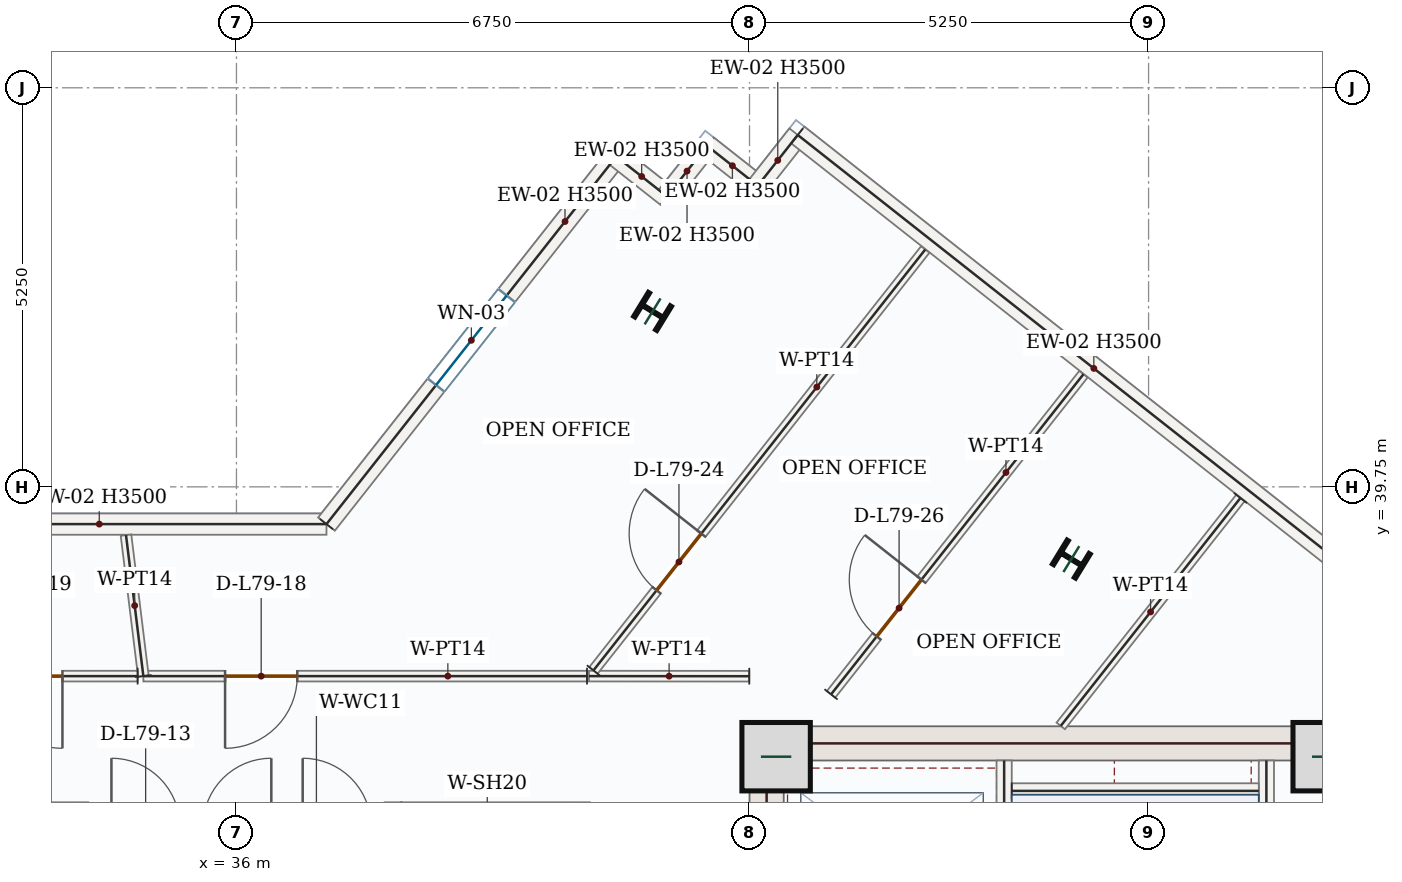
"""IFC4 building model, lengths in metres.
Left out: names, types, materials, properties, quantities, classifications, styles, units other than length and angle.
Written with IfcOpenShell. Run it as: python <this file> out.ifc"""

import sys

from ifc_helpers import new_model, si_unit, direction, frame, frame_2d, origin, origin_2d, place, context, subcontext, project, spatial, rectangle, i_section, extrude, source, transform, mapped, element, fill, save


model = new_model("IFC4")
c1 = context("Model", 3, precision=1e-05, world=origin(), true_north=direction((0.0, 1.0)))
c2 = subcontext(c1, "Body", "Model", "MODEL_VIEW")
j1 = project(units=[si_unit("LENGTHUNIT", "METRE"), si_unit("PLANEANGLEUNIT", "RADIAN")], contexts=[c1])
p1 = place(None, origin())
s1 = spatial("IfcSite", under=j1, at=p1, CompositionType="ELEMENT")
p2 = place(p1, origin())
s2 = spatial("IfcBuilding", under=s1, at=p2, CompositionType="ELEMENT")
p3 = place(p2, frame((0.0, 0.0, 327.3)))
s3 = spatial("IfcBuildingStorey", under=s2, at=p3, CompositionType="ELEMENT", Elevation=327.3)
p4 = place(p3, frame((42.975, 28.05, 0.0), z_axis=(0.0, 0.0, 1.0), x_axis=(0.0, 1.0, 0.0)))
e1 = element("IfcWall", 1, at=p4, inside=s3, PredefinedType="SHEAR", context=c2, shape_type="SweptSolid", body=[
    extrude(rectangle(XDim=8.55, YDim=0.45, at=frame_2d((4.275, 0.0))), origin(), (0.0, 0.0, 1.0), 3.5),
])
p5 = place(p4, frame((1.5, 0.0, 0.0)))
e2 = element("IfcOpeningElement", 2, at=p5, cuts=e1, PredefinedType="OPENING", context=c2, shape_type="SweptSolid", body=[
    extrude(rectangle(XDim=1.1, YDim=2.2, at=frame_2d((0.55, 1.1))), frame((0.0, 0.235, 0.0), z_axis=(0.0, -1.0, 0.0), x_axis=(1.0, 0.0, 0.0)), (0.0, 0.0, 1.0), 0.47),
])
m1 = source(origin(), c2, "Body", "SweptSolid", [
    extrude(rectangle(XDim=7.1, YDim=0.45, at=frame_2d((3.55, 0.0))), origin(), (0.0, 0.0, 1.0), 3.5),
])
p6 = place(p3, frame((43.2, 36.375, 0.0), z_axis=(0.0, 0.0, 1.0), x_axis=(1.0, 0.0, 0.0)))
e3 = element("IfcWall", 3, at=p6, inside=s3, PredefinedType="SHEAR", context=c2, shape_type="MappedRepresentation", body=[
    mapped(m1, transform((0.0, 0.0, 0.0), x_axis=(1.0, 0.0, 0.0), y_axis=(0.0, 1.0, 0.0), z_axis=(0.0, 0.0, 1.0), scale=1.0)),
])
m2 = source(origin(), c2, "Body", "SweptSolid", [
    extrude(rectangle(XDim=0.9, YDim=0.9, at=origin_2d()), origin(), (0.0, 0.0, 1.0), 3.75),
])
for number, where, z_axis, x_axis in (
    (4, (43.1, 36.2, 0.0), (0.0, 0.0, 1.0), (1.0, 0.0, 0.0)),
    (5, (50.35, 36.2, 0.0), (0.0, 0.0, 1.0), (1.0, 0.0, 0.0)),
):
    element("IfcColumn", number, at=place(p3, frame(where, z_axis=z_axis, x_axis=x_axis)), inside=s3, PredefinedType="COLUMN", context=c2, shape_type="MappedRepresentation", body=[
        mapped(m2, transform((0.0, 0.0, 0.0), x_axis=(1.0, 0.0, 0.0), y_axis=(0.0, 1.0, 0.0), z_axis=(0.0, 0.0, 1.0), scale=1.0)),
    ])
m3 = source(origin(), c2, "Body", "SweptSolid", [
    extrude(i_section(OverallWidth=0.369, OverallDepth=0.356, WebThickness=0.011, FlangeThickness=0.018, FilletRadius=0.018, at=origin_2d()), origin(), (0.0, 0.0, 1.0), 3.75),
])
for number, where, z_axis, x_axis in (
    (6, (46.984, 38.8, 0.0), (0.0, 0.0, 1.0), (0.522, 0.853, 0.0)),
    (7, (41.475, 42.058, 0.0), (0.0, 0.0, 1.0), (0.522, 0.853, 0.0)),
):
    element("IfcColumn", number, at=place(p3, frame(where, z_axis=z_axis, x_axis=x_axis)), inside=s3, PredefinedType="COLUMN", context=c2, shape_type="MappedRepresentation", body=[
        mapped(m3, transform((0.0, 0.0, 0.0), x_axis=(1.0, 0.0, 0.0), y_axis=(0.0, 1.0, 0.0), z_axis=(0.0, 0.0, 1.0), scale=1.0)),
    ])
m4 = source(origin(), c2, "Body", "SweptSolid", [
    extrude(rectangle(XDim=5.978, YDim=0.28, at=frame_2d((2.989, 0.0))), origin(), (0.0, 0.0, 1.0), 3.5),
])
p7 = place(p3, frame((31.206, 39.26, 0.0), z_axis=(0.0, 0.0, 1.0), x_axis=(1.0, 0.0, 0.0)))
e8 = element("IfcWall", 8, at=p7, inside=s3, PredefinedType="SOLIDWALL", context=c2, shape_type="MappedRepresentation", body=[
    mapped(m4, transform((0.0, 0.0, 0.0), x_axis=(1.0, 0.0, 0.0), y_axis=(0.0, 1.0, 0.0), z_axis=(0.0, 0.0, 1.0), scale=1.0)),
])
p8 = place(p3, frame((37.184, 39.26, 0.0), z_axis=(0.0, 0.0, 1.0), x_axis=(0.619100474058, 0.78531178714, 0.0)))
e9 = element("IfcWall", 9, at=p8, inside=s3, PredefinedType="SOLIDWALL", context=c2, shape_type="SweptSolid", body=[
    extrude(rectangle(XDim=6.159, YDim=0.28, at=frame_2d((3.08, 0.0))), origin(), (0.0, 0.0, 1.0), 3.5),
])
p9 = place(p8, frame((2.329, 0.0, 0.85)))
e10 = element("IfcOpeningElement", 10, at=p9, cuts=e9, PredefinedType="OPENING", context=c2, shape_type="SweptSolid", body=[
    extrude(rectangle(XDim=1.5, YDim=1.5, at=frame_2d((0.75, 0.75))), frame((0.0, 0.15, 0.0), z_axis=(0.0, -1.0, 0.0), x_axis=(1.0, 0.0, 0.0)), (0.0, 0.0, 1.0), 0.3),
])
m5 = source(origin(), c2, "Body", "SweptSolid", [
    extrude(rectangle(XDim=0.85, YDim=0.28, at=frame_2d((0.425, 0.0))), origin(), (0.0, 0.0, 1.0), 3.5),
])
p10 = place(p3, frame((40.997, 44.097, 0.0), z_axis=(0.0, 0.0, 1.0), x_axis=(0.785220826193, -0.619215838066, 0.0)))
e11 = element("IfcWall", 11, at=p10, inside=s3, PredefinedType="SOLIDWALL", context=c2, shape_type="MappedRepresentation", body=[
    mapped(m5, transform((0.0, 0.0, 0.0), x_axis=(1.0, 0.0, 0.0), y_axis=(0.0, 1.0, 0.0), z_axis=(0.0, 0.0, 1.0), scale=1.0)),
])
m6 = source(origin(), c2, "Body", "SweptSolid", [
    extrude(rectangle(XDim=0.85, YDim=0.28, at=frame_2d((0.425, 0.0))), origin(), (0.0, 0.0, 1.0), 3.5),
])
for number, where, z_axis, x_axis in (
    (12, (41.665, 43.57, 0.0), (0.0, 0.0, 1.0), (0.619, 0.785, 0.0)),
    (13, (42.191, 44.238, 0.0), (0.0, 0.0, 1.0), (0.785, -0.619, 0.0)),
):
    element("IfcWall", number, at=place(p3, frame(where, z_axis=z_axis, x_axis=x_axis)), inside=s3, PredefinedType="SOLIDWALL", context=c2, shape_type="MappedRepresentation", body=[
        mapped(m6, transform((0.0, 0.0, 0.0), x_axis=(1.0, 0.0, 0.0), y_axis=(0.0, 1.0, 0.0), z_axis=(0.0, 0.0, 1.0), scale=1.0)),
    ])
p11 = place(p3, frame((42.858, 43.712, 0.0), z_axis=(0.0, 0.0, 1.0), x_axis=(0.619215838066, 0.785220826193, 0.0)))
e14 = element("IfcWall", 14, at=p11, inside=s3, PredefinedType="SOLIDWALL", context=c2, shape_type="MappedRepresentation", body=[
    mapped(m5, transform((0.0, 0.0, 0.0), x_axis=(1.0, 0.0, 0.0), y_axis=(0.0, 1.0, 0.0), z_axis=(0.0, 0.0, 1.0), scale=1.0)),
])
m7 = source(origin(), c2, "Body", "SweptSolid", [
    extrude(rectangle(XDim=9.92, YDim=0.28, at=frame_2d((4.96, 0.0))), origin(), (0.0, 0.0, 1.0), 3.5),
])
p12 = place(p3, frame((43.385, 44.379, 0.0), z_axis=(0.0, 0.0, 1.0), x_axis=(0.785317257435, -0.619093535077, 0.0)))
e15 = element("IfcWall", 15, at=p12, inside=s3, PredefinedType="SOLIDWALL", context=c2, shape_type="MappedRepresentation", body=[
    mapped(m7, transform((0.0, 0.0, 0.0), x_axis=(1.0, 0.0, 0.0), y_axis=(0.0, 1.0, 0.0), z_axis=(0.0, 0.0, 1.0), scale=1.0)),
])
m8 = source(origin(), c2, "Body", "SweptSolid", [
    extrude(rectangle(XDim=7.87, YDim=0.2, at=frame_2d((3.935, 0.0))), origin(), (0.0, 0.0, 1.0), 3.5),
])
p13 = place(p3, frame((49.55, 28.28, 0.0), z_axis=(0.0, 0.0, 1.0), x_axis=(0.0, 1.0, 0.0)))
e16 = element("IfcWall", 16, at=p13, inside=s3, PredefinedType="SOLIDWALL", context=c2, shape_type="MappedRepresentation", body=[
    mapped(m8, transform((0.0, 0.0, 0.0), x_axis=(1.0, 0.0, 0.0), y_axis=(0.0, 1.0, 0.0), z_axis=(0.0, 0.0, 1.0), scale=1.0)),
])
p14 = place(p3, frame((46.1, 28.15, 0.0), z_axis=(0.0, 0.0, 1.0), x_axis=(0.0, 1.0, 0.0)))
e17 = element("IfcWall", 17, at=p14, inside=s3, PredefinedType="SOLIDWALL", context=c2, shape_type="SweptSolid", body=[
    extrude(rectangle(XDim=8.0, YDim=0.2, at=frame_2d((4.0, 0.0))), origin(), (0.0, 0.0, 1.0), 3.5),
])
p15 = place(p14, frame((0.4, 0.0, 0.0)))
e18 = element("IfcOpeningElement", 18, at=p15, cuts=e17, PredefinedType="OPENING", context=c2, shape_type="SweptSolid", body=[
    extrude(rectangle(XDim=1.05, YDim=2.15, at=frame_2d((0.525, 1.075))), frame((0.0, 0.11, 0.0), z_axis=(0.0, -1.0, 0.0), x_axis=(1.0, 0.0, 0.0)), (0.0, 0.0, 1.0), 0.22),
])
m9 = source(origin(), c2, "Body", "SweptSolid", [
    extrude(rectangle(XDim=3.25, YDim=0.2, at=frame_2d((1.625, 0.0))), origin(), (0.0, 0.0, 1.0), 3.5),
])
p16 = place(p3, frame((46.2, 35.75, 0.0), z_axis=(0.0, 0.0, 1.0), x_axis=(1.0, 0.0, 0.0)))
e19 = element("IfcWall", 19, at=p16, inside=s3, PredefinedType="SOLIDWALL", context=c2, shape_type="MappedRepresentation", body=[
    mapped(m9, transform((0.0, 0.0, 0.0), x_axis=(1.0, 0.0, 0.0), y_axis=(0.0, 1.0, 0.0), z_axis=(0.0, 0.0, 1.0), scale=1.0)),
])
m10 = source(origin(), c2, "Body", "SweptSolid", [
    extrude(rectangle(XDim=2.4, YDim=0.2, at=frame_2d((1.2, 0.0))), origin(), (0.0, 0.0, 1.0), 3.5),
])
for number, where, z_axis, x_axis in (
    (20, (33.95, 33.2, 0.0), (0.0, 0.0, 1.0), (0.0, 1.0, 0.0)),
    (21, (38.05, 33.2, 0.0), (0.0, 0.0, 1.0), (0.0, 1.0, 0.0)),
):
    element("IfcWall", number, at=place(p3, frame(where, z_axis=z_axis, x_axis=x_axis)), inside=s3, PredefinedType="SOLIDWALL", context=c2, shape_type="MappedRepresentation", body=[
        mapped(m10, transform((0.0, 0.0, 0.0), x_axis=(1.0, 0.0, 0.0), y_axis=(0.0, 1.0, 0.0), z_axis=(0.0, 0.0, 1.0), scale=1.0)),
    ])
p17 = place(p3, frame((40.55, 33.2, 0.0), z_axis=(0.0, 0.0, 1.0), x_axis=(0.0, 1.0, 0.0)))
e22 = element("IfcWall", 22, at=p17, inside=s3, PredefinedType="SOLIDWALL", context=c2, shape_type="SweptSolid", body=[
    extrude(rectangle(XDim=2.4, YDim=0.2, at=frame_2d((1.2, 0.0))), origin(), (0.0, 0.0, 1.0), 3.5),
])
p18 = place(p17, frame((0.65, 0.0, 0.0)))
e23 = element("IfcOpeningElement", 23, at=p18, cuts=e22, PredefinedType="OPENING", context=c2, shape_type="SweptSolid", body=[
    extrude(rectangle(XDim=1.1, YDim=2.15, at=frame_2d((0.55, 1.075))), frame((0.0, 0.11, 0.0), z_axis=(0.0, -1.0, 0.0), x_axis=(1.0, 0.0, 0.0)), (0.0, 0.0, 1.0), 0.22),
])
m11 = source(origin(), c2, "Body", "SweptSolid", [
    extrude(rectangle(XDim=3.818, YDim=0.14, at=frame_2d((1.909, 0.0))), origin(), (0.0, 0.0, 1.0), 3.5),
])
p19 = place(p3, frame((49.208, 39.604, 0.0), z_axis=(0.0, 0.0, 1.0), x_axis=(-0.619119655452, -0.78529666511, 0.0)))
e24 = element("IfcWall", 24, at=p19, inside=s3, PredefinedType="PARTITIONING", context=c2, shape_type="MappedRepresentation", body=[
    mapped(m11, transform((0.0, 0.0, 0.0), x_axis=(1.0, 0.0, 0.0), y_axis=(0.0, 1.0, 0.0), z_axis=(0.0, 0.0, 1.0), scale=1.0)),
])
p20 = place(p3, frame((43.823, 37.02, 0.0), z_axis=(0.0, 0.0, 1.0), x_axis=(0.619105408422, 0.785307897109, 0.0)))
e25 = element("IfcWall", 25, at=p20, inside=s3, PredefinedType="PARTITIONING", context=c2, shape_type="SweptSolid", body=[
    extrude(rectangle(XDim=5.363, YDim=0.14, at=frame_2d((2.682, 0.0))), origin(), (0.0, 0.0, 1.0), 3.5),
])
p21 = place(p20, frame((0.971, 0.0, 0.0)))
e26 = element("IfcOpeningElement", 26, at=p21, cuts=e25, PredefinedType="OPENING", context=c2, shape_type="SweptSolid", body=[
    extrude(rectangle(XDim=0.95, YDim=2.15, at=frame_2d((0.475, 1.075))), frame((0.0, 0.08, 0.0), z_axis=(0.0, -1.0, 0.0), x_axis=(1.0, 0.0, 0.0)), (0.0, 0.0, 1.0), 0.16),
])
m12 = source(origin(), c2, "Body", "SweptSolid", [
    extrude(rectangle(XDim=2.109, YDim=0.14, at=frame_2d((1.054, 0.0))), origin(), (0.0, 0.0, 1.0), 3.5),
])
p22 = place(p3, frame((42.747, 37.259, 0.0), z_axis=(0.0, 0.0, 1.0), x_axis=(-0.999999832474, 0.000578837597, 0.0)))
e27 = element("IfcWall", 27, at=p22, inside=s3, PredefinedType="PARTITIONING", context=c2, shape_type="MappedRepresentation", body=[
    mapped(m12, transform((0.0, 0.0, 0.0), x_axis=(1.0, 0.0, 0.0), y_axis=(0.0, 1.0, 0.0), z_axis=(0.0, 0.0, 1.0), scale=1.0)),
])
p23 = place(p3, frame((40.697, 37.335, 0.0), z_axis=(0.0, 0.0, 1.0), x_axis=(0.619105259882, 0.785308014213, 0.0)))
e28 = element("IfcWall", 28, at=p23, inside=s3, PredefinedType="PARTITIONING", context=c2, shape_type="SweptSolid", body=[
    extrude(rectangle(XDim=7.051, YDim=0.14, at=frame_2d((3.525, 0.0))), origin(), (0.0, 0.0, 1.0), 3.5),
])
p24 = place(p23, frame((1.342, 0.0, 0.0)))
e29 = element("IfcOpeningElement", 29, at=p24, cuts=e28, PredefinedType="OPENING", context=c2, shape_type="SweptSolid", body=[
    extrude(rectangle(XDim=0.95, YDim=2.15, at=frame_2d((0.475, 1.075))), frame((0.0, 0.08, 0.0), z_axis=(0.0, -1.0, 0.0), x_axis=(1.0, 0.0, 0.0)), (0.0, 0.0, 1.0), 0.16),
])
p25 = place(p3, frame((40.612, 37.26, 0.0), z_axis=(0.0, 0.0, 1.0), x_axis=(-1.0, 0.0, 0.0)))
e30 = element("IfcWall", 30, at=p25, inside=s3, PredefinedType="PARTITIONING", context=c2, shape_type="SweptSolid", body=[
    extrude(rectangle(XDim=5.837, YDim=0.14, at=frame_2d((2.918, 0.0))), origin(), (0.0, 0.0, 1.0), 3.5),
])
p26 = place(p25, frame((3.812, 0.0, 0.0)))
e31 = element("IfcOpeningElement", 31, at=p26, cuts=e30, PredefinedType="OPENING", context=c2, shape_type="SweptSolid", body=[
    extrude(rectangle(XDim=0.95, YDim=2.15, at=frame_2d((0.475, 1.075))), frame((0.0, 0.08, 0.0), z_axis=(0.0, -1.0, 0.0), x_axis=(1.0, 0.0, 0.0)), (0.0, 0.0, 1.0), 0.16),
])
m13 = source(origin(), c2, "Body", "SweptSolid", [
    extrude(rectangle(XDim=1.869, YDim=0.14, at=frame_2d((0.934, 0.0))), origin(), (0.0, 0.0, 1.0), 3.5),
])
p27 = place(p3, frame((34.775, 37.26, 0.0), z_axis=(0.0, 0.0, 1.0), x_axis=(-0.122153221409, 0.992511254596, 0.0)))
e32 = element("IfcWall", 32, at=p27, inside=s3, PredefinedType="PARTITIONING", context=c2, shape_type="MappedRepresentation", body=[
    mapped(m13, transform((0.0, 0.0, 0.0), x_axis=(1.0, 0.0, 0.0), y_axis=(0.0, 1.0, 0.0), z_axis=(0.0, 0.0, 1.0), scale=1.0)),
])
p28 = place(p3, frame((34.7, 37.26, 0.0), z_axis=(0.0, 0.0, 1.0), x_axis=(-0.999999995981, -8.9657955e-05, 0.0)))
e33 = element("IfcWall", 33, at=p28, inside=s3, PredefinedType="PARTITIONING", context=c2, shape_type="SweptSolid", body=[
    extrude(rectangle(XDim=5.446, YDim=0.14, at=frame_2d((2.723, 0.0))), origin(), (0.0, 0.0, 1.0), 3.5),
])
p29 = place(p28, frame((0.989, 0.0, 0.0)))
e34 = element("IfcOpeningElement", 34, at=p29, cuts=e33, PredefinedType="OPENING", context=c2, shape_type="SweptSolid", body=[
    extrude(rectangle(XDim=0.95, YDim=2.15, at=frame_2d((0.475, 1.075))), frame((0.0, 0.08, 0.0), z_axis=(0.0, -1.0, 0.0), x_axis=(1.0, 0.0, 0.0)), (0.0, 0.0, 1.0), 0.16),
])
m14 = source(origin(), c2, "Body", "SweptSolid", [
    extrude(rectangle(XDim=1.5, YDim=1.5, at=frame_2d((0.75, 0.75))), frame((0.0, 0.03, 0.0), z_axis=(0.0, -1.0, 0.0), x_axis=(1.0, 0.0, 0.0)), (0.0, 0.0, 1.0), 0.06),
])
p30 = place(p9, origin())
e35 = element("IfcWindow", 35, at=p30, inside=s3, PartitioningType="SINGLE_PANEL", PredefinedType="WINDOW", context=c2, shape_type="MappedRepresentation", body=[
    mapped(m14, transform((0.0, 0.0, 0.0), x_axis=(1.0, 0.0, 0.0), y_axis=(0.0, 1.0, 0.0), z_axis=(0.0, 0.0, 1.0), scale=1.0)),
])
fill(e10, e35)
m15 = source(origin(), c2, "Body", "SweptSolid", [
    extrude(rectangle(XDim=0.95, YDim=2.15, at=frame_2d((0.475, 1.075))), frame((0.0, 0.025, 0.0), z_axis=(0.0, -1.0, 0.0), x_axis=(1.0, 0.0, 0.0)), (0.0, 0.0, 1.0), 0.05),
])
p31 = place(p26, origin())
e36 = element("IfcDoor", 36, at=p31, inside=s3, OperationType="SINGLE_SWING_RIGHT", PredefinedType="DOOR", context=c2, shape_type="MappedRepresentation", body=[
    mapped(m15, transform((0.0, 0.0, 0.0), x_axis=(1.0, 0.0, 0.0), y_axis=(0.0, 1.0, 0.0), z_axis=(0.0, 0.0, 1.0), scale=1.0)),
])
fill(e31, e36)
p32 = place(p29, origin())
e37 = element("IfcDoor", 37, at=p32, inside=s3, OperationType="SINGLE_SWING_LEFT", PredefinedType="DOOR", context=c2, shape_type="MappedRepresentation", body=[
    mapped(m15, transform((0.0, 0.0, 0.0), x_axis=(1.0, 0.0, 0.0), y_axis=(0.0, 1.0, 0.0), z_axis=(0.0, 0.0, 1.0), scale=1.0)),
])
fill(e34, e37)
p33 = place(p24, origin())
e38 = element("IfcDoor", 38, at=p33, inside=s3, OperationType="SINGLE_SWING_RIGHT", PredefinedType="DOOR", context=c2, shape_type="MappedRepresentation", body=[
    mapped(m15, transform((0.0, 0.0, 0.0), x_axis=(1.0, 0.0, 0.0), y_axis=(0.0, 1.0, 0.0), z_axis=(0.0, 0.0, 1.0), scale=1.0)),
])
fill(e29, e38)
p34 = place(p21, origin())
e39 = element("IfcDoor", 39, at=p34, inside=s3, OperationType="SINGLE_SWING_RIGHT", PredefinedType="DOOR", context=c2, shape_type="MappedRepresentation", body=[
    mapped(m15, transform((0.0, 0.0, 0.0), x_axis=(1.0, 0.0, 0.0), y_axis=(0.0, 1.0, 0.0), z_axis=(0.0, 0.0, 1.0), scale=1.0)),
])
fill(e26, e39)
save(model, sys.argv[1])
